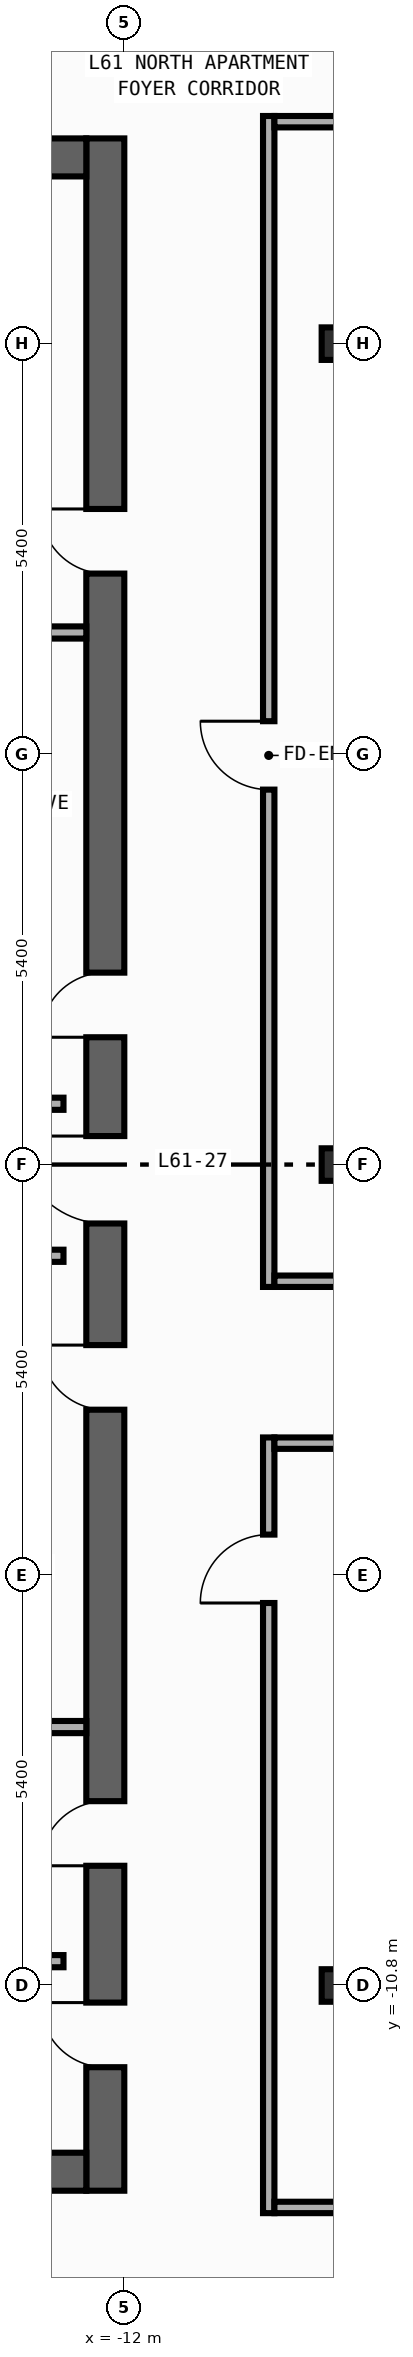
"""IFC4 building model, lengths in metres.
Left out: names, types, materials, properties, quantities, classifications, styles, units other than length and angle.
Written with IfcOpenShell. Run it as: python <this file> out.ifc"""

import sys

from ifc_helpers import new_model, si_unit, direction, frame, frame_2d, origin, origin_2d, place, context, subcontext, project, spatial, rectangle, i_section, extrude, element, fill, save


model = new_model("IFC4")
c1 = context("Model", 3, precision=1e-05, world=origin(), true_north=direction((0.0, 1.0)))
c2 = subcontext(c1, "Body", "Model", "MODEL_VIEW")
j1 = project(units=[si_unit("LENGTHUNIT", "METRE"), si_unit("PLANEANGLEUNIT", "RADIAN")], contexts=[c1])
p1 = place(None, origin())
s1 = spatial("IfcSite", under=j1, at=p1, CompositionType="ELEMENT")
p2 = place(p1, origin())
s2 = spatial("IfcBuilding", under=s1, at=p2, CompositionType="ELEMENT")
p3 = place(p2, frame((0.0, 0.0, 258.4)))
s3 = spatial("IfcBuildingStorey", under=s2, at=p3, CompositionType="ELEMENT", Elevation=258.4)
p4 = place(p3, frame((-12.25, -13.5, 0.0), z_axis=(0.0, 0.0, 1.0), x_axis=(0.0, 1.0, 0.0)))
e1 = element("IfcWall", 1, at=p4, inside=s3, PredefinedType="SHEAR", context=c2, shape_type="SweptSolid", body=[
    extrude(rectangle(XDim=27.0, YDim=0.5, at=frame_2d((13.5, 0.0))), origin(), (0.0, 0.0, 1.0), 3.34),
])
p5 = place(p4, frame((15.175, 0.0, 0.0)))
e2 = element("IfcOpeningElement", 2, at=p5, cuts=e1, PredefinedType="OPENING", context=c2, shape_type="SweptSolid", body=[
    extrude(rectangle(XDim=0.85, YDim=2.1, at=frame_2d((0.425, 1.05))), frame((0.0, 0.26, 0.0), z_axis=(0.0, -1.0, 0.0), x_axis=(1.0, 0.0, 0.0)), (0.0, 0.0, 1.0), 0.52),
])
p6 = place(p4, frame((21.275, 0.0, 0.0)))
e3 = element("IfcOpeningElement", 3, at=p6, cuts=e1, PredefinedType="OPENING", context=c2, shape_type="SweptSolid", body=[
    extrude(rectangle(XDim=0.85, YDim=2.1, at=frame_2d((0.425, 1.05))), frame((0.0, 0.26, 0.0), z_axis=(0.0, -1.0, 0.0), x_axis=(1.0, 0.0, 0.0)), (0.0, 0.0, 1.0), 0.52),
])
p7 = place(p4, frame((4.275, 0.0, 0.0)))
e4 = element("IfcOpeningElement", 4, at=p7, cuts=e1, PredefinedType="OPENING", context=c2, shape_type="SweptSolid", body=[
    extrude(rectangle(XDim=0.85, YDim=2.1, at=frame_2d((0.425, 1.05))), frame((0.0, 0.26, 0.0), z_axis=(0.0, -1.0, 0.0), x_axis=(1.0, 0.0, 0.0)), (0.0, 0.0, 1.0), 0.52),
])
p8 = place(p4, frame((10.275, 0.0, 0.0)))
e5 = element("IfcOpeningElement", 5, at=p8, cuts=e1, PredefinedType="OPENING", context=c2, shape_type="SweptSolid", body=[
    extrude(rectangle(XDim=0.85, YDim=2.1, at=frame_2d((0.425, 1.05))), frame((0.0, 0.26, 0.0), z_axis=(0.0, -1.0, 0.0), x_axis=(1.0, 0.0, 0.0)), (0.0, 0.0, 1.0), 0.52),
])
p9 = place(p4, frame((12.725, 0.0, 0.0)))
e6 = element("IfcOpeningElement", 6, at=p9, cuts=e1, PredefinedType="OPENING", context=c2, shape_type="SweptSolid", body=[
    extrude(rectangle(XDim=1.15, YDim=2.2, at=frame_2d((0.575, 1.1))), frame((0.0, 0.26, 0.0), z_axis=(0.0, -1.0, 0.0), x_axis=(1.0, 0.0, 0.0)), (0.0, 0.0, 1.0), 0.52),
])
p10 = place(p4, frame((1.625, 0.0, 0.0)))
e7 = element("IfcOpeningElement", 7, at=p10, cuts=e1, PredefinedType="OPENING", context=c2, shape_type="SweptSolid", body=[
    extrude(rectangle(XDim=0.85, YDim=2.1, at=frame_2d((0.425, 1.05))), frame((0.0, 0.26, 0.0), z_axis=(0.0, -1.0, 0.0), x_axis=(1.0, 0.0, 0.0)), (0.0, 0.0, 1.0), 0.52),
])
for number, where, z_axis, x_axis in (
    (8, (-19.9, -13.25, 0.0), (0.0, 0.0, 1.0), (1.0, 0.0, 0.0)),
    (9, (-19.9, 13.25, 0.0), (0.0, 0.0, 1.0), (1.0, 0.0, 0.0)),
):
    element("IfcWall", number, at=place(p3, frame(where, z_axis=z_axis, x_axis=x_axis)), inside=s3, PredefinedType="SHEAR", context=c2, shape_type="SweptSolid", body=[
        extrude(rectangle(XDim=7.4, YDim=0.5, at=frame_2d((3.7, 0.0))), origin(), (0.0, 0.0, 1.0), 3.34),
    ])
for number, where, z_axis, x_axis in (
    (10, (-9.2, -10.8, 0.0), (0.0, 0.0, 1.0), (1.0, 0.0, 0.0)),
    (11, (-9.2, 0.0, 0.0), (0.0, 0.0, 1.0), (1.0, 0.0, 0.0)),
    (12, (-9.2, 10.8, 0.0), (0.0, 0.0, 1.0), (1.0, 0.0, 0.0)),
):
    element("IfcColumn", number, at=place(p3, frame(where, z_axis=z_axis, x_axis=x_axis)), inside=s3, PredefinedType="COLUMN", context=c2, shape_type="SweptSolid", body=[
        extrude(i_section(OverallWidth=0.407, OverallDepth=0.428, WebThickness=0.02, FlangeThickness=0.035, FilletRadius=0.022, at=origin_2d()), origin(), (0.0, 0.0, 1.0), 3.6),
    ])
for number, where, z_axis, x_axis in (
    (13, (-15.4, 0.8, 0.0), (0.0, 0.0, 1.0), (1.0, 0.0, 0.0)),
    (14, (-15.4, -1.2, 0.0), (0.0, 0.0, 1.0), (1.0, 0.0, 0.0)),
    (15, (-15.4, -10.48, 0.0), (0.0, 0.0, 1.0), (1.0, 0.0, 0.0)),
):
    element("IfcWall", number, at=place(p3, frame(where, z_axis=z_axis, x_axis=x_axis)), inside=s3, PredefinedType="STANDARD", context=c2, shape_type="SweptSolid", body=[
        extrude(rectangle(XDim=2.6, YDim=0.16, at=frame_2d((1.3, 0.0))), origin(), (0.0, 0.0, 1.0), 3.34),
    ])
for number, where, z_axis, x_axis in (
    (16, (-15.4, 7.0, 0.0), (0.0, 0.0, 1.0), (1.0, 0.0, 0.0)),
    (17, (-15.4, -7.4, 0.0), (0.0, 0.0, 1.0), (1.0, 0.0, 0.0)),
):
    element("IfcWall", number, at=place(p3, frame(where, z_axis=z_axis, x_axis=x_axis)), inside=s3, PredefinedType="PARTITIONING", context=c2, shape_type="SweptSolid", body=[
        extrude(rectangle(XDim=2.9, YDim=0.16, at=frame_2d((1.45, 0.0))), origin(), (0.0, 0.0, 1.0), 3.34),
    ])
p11 = place(p3, frame((-10.1, -1.61, 0.0), z_axis=(0.0, 0.0, 1.0), x_axis=(0.0, 1.0, 0.0)))
e18 = element("IfcWall", 18, at=p11, inside=s3, PredefinedType="PARTITIONING", context=c2, shape_type="SweptSolid", body=[
    extrude(rectangle(XDim=15.405, YDim=0.15, at=frame_2d((7.703, 0.0))), origin(), (0.0, 0.0, 1.0), 3.34),
])
p12 = place(p11, frame((6.543, 0.0, 0.0)))
e19 = element("IfcOpeningElement", 19, at=p12, cuts=e18, PredefinedType="OPENING", context=c2, shape_type="SweptSolid", body=[
    extrude(rectangle(XDim=0.9, YDim=2.15, at=frame_2d((0.45, 1.075))), frame((0.0, 0.085, 0.0), z_axis=(0.0, -1.0, 0.0), x_axis=(1.0, 0.0, 0.0)), (0.0, 0.0, 1.0), 0.17),
])
p13 = place(p3, frame((-10.1, -13.795, 0.0), z_axis=(0.0, 0.0, 1.0), x_axis=(0.0, 1.0, 0.0)))
e20 = element("IfcWall", 20, at=p13, inside=s3, PredefinedType="PARTITIONING", context=c2, shape_type="SweptSolid", body=[
    extrude(rectangle(XDim=10.205, YDim=0.15, at=frame_2d((5.103, 0.0))), origin(), (0.0, 0.0, 1.0), 3.34),
])
p14 = place(p13, frame((8.027, 0.0, 0.0)))
e21 = element("IfcOpeningElement", 21, at=p14, cuts=e20, PredefinedType="OPENING", context=c2, shape_type="SweptSolid", body=[
    extrude(rectangle(XDim=0.9, YDim=2.15, at=frame_2d((0.45, 1.075))), frame((0.0, 0.085, 0.0), z_axis=(0.0, -1.0, 0.0), x_axis=(1.0, 0.0, 0.0)), (0.0, 0.0, 1.0), 0.17),
])
p15 = place(p3, frame((-10.025, -1.535, 0.0), z_axis=(0.0, 0.0, 1.0), x_axis=(1.0, 0.0, 0.0)))
e22 = element("IfcWall", 22, at=p15, inside=s3, PredefinedType="PARTITIONING", context=c2, shape_type="SweptSolid", body=[
    extrude(rectangle(XDim=6.235, YDim=0.15, at=frame_2d((3.117, 0.0))), origin(), (0.0, 0.0, 1.0), 3.34),
])
p16 = place(p15, frame((4.875, 0.0, 0.0)))
e23 = element("IfcOpeningElement", 23, at=p16, cuts=e22, PredefinedType="OPENING", context=c2, shape_type="SweptSolid", body=[
    extrude(rectangle(XDim=0.9, YDim=2.15, at=frame_2d((0.45, 1.075))), frame((0.0, 0.085, 0.0), z_axis=(0.0, -1.0, 0.0), x_axis=(1.0, 0.0, 0.0)), (0.0, 0.0, 1.0), 0.17),
])
p17 = place(p3, frame((-10.025, -3.665, 0.0), z_axis=(0.0, 0.0, 1.0), x_axis=(1.0, 0.0, 0.0)))
e24 = element("IfcWall", 24, at=p17, inside=s3, PredefinedType="PARTITIONING", context=c2, shape_type="SweptSolid", body=[
    extrude(rectangle(XDim=6.255, YDim=0.15, at=frame_2d((3.127, 0.0))), origin(), (0.0, 0.0, 1.0), 3.34),
])
p18 = place(p17, frame((4.895, 0.0, 0.0)))
e25 = element("IfcOpeningElement", 25, at=p18, cuts=e24, PredefinedType="OPENING", context=c2, shape_type="SweptSolid", body=[
    extrude(rectangle(XDim=0.9, YDim=2.15, at=frame_2d((0.45, 1.075))), frame((0.0, 0.085, 0.0), z_axis=(0.0, -1.0, 0.0), x_axis=(1.0, 0.0, 0.0)), (0.0, 0.0, 1.0), 0.17),
])
p19 = place(p3, frame((-10.025, 13.72, 0.0), z_axis=(0.0, 0.0, 1.0), x_axis=(1.0, 0.0, 0.0)))
e26 = element("IfcWall", 26, at=p19, inside=s3, PredefinedType="PARTITIONING", context=c2, shape_type="SweptSolid", body=[
    extrude(rectangle(XDim=6.085, YDim=0.15, at=frame_2d((3.042, 0.0))), origin(), (0.0, 0.0, 1.0), 3.34),
])
p20 = place(p19, frame((4.116, 0.0, 0.0)))
e27 = element("IfcOpeningElement", 27, at=p20, cuts=e26, PredefinedType="OPENING", context=c2, shape_type="SweptSolid", body=[
    extrude(rectangle(XDim=0.9, YDim=2.15, at=frame_2d((0.45, 1.075))), frame((0.0, 0.085, 0.0), z_axis=(0.0, -1.0, 0.0), x_axis=(1.0, 0.0, 0.0)), (0.0, 0.0, 1.0), 0.17),
])
p21 = place(p3, frame((-10.025, -13.72, 0.0), z_axis=(0.0, 0.0, 1.0), x_axis=(1.0, 0.0, 0.0)))
e28 = element("IfcWall", 28, at=p21, inside=s3, PredefinedType="PARTITIONING", context=c2, shape_type="SweptSolid", body=[
    extrude(rectangle(XDim=6.255, YDim=0.15, at=frame_2d((3.127, 0.0))), origin(), (0.0, 0.0, 1.0), 3.34),
])
p22 = place(p21, frame((4.29, 0.0, 0.0)))
e29 = element("IfcOpeningElement", 29, at=p22, cuts=e28, PredefinedType="OPENING", context=c2, shape_type="SweptSolid", body=[
    extrude(rectangle(XDim=0.9, YDim=2.15, at=frame_2d((0.45, 1.075))), frame((0.0, 0.085, 0.0), z_axis=(0.0, -1.0, 0.0), x_axis=(1.0, 0.0, 0.0)), (0.0, 0.0, 1.0), 0.17),
])
p23 = place(p5, origin())
e30 = element("IfcDoor", 30, at=p23, inside=s3, OperationType="SINGLE_SWING_LEFT", PredefinedType="DOOR", context=c2, shape_type="SweptSolid", body=[
    extrude(rectangle(XDim=0.85, YDim=2.1, at=frame_2d((0.425, 1.05))), frame((0.0, 0.025, 0.0), z_axis=(0.0, -1.0, 0.0), x_axis=(1.0, 0.0, 0.0)), (0.0, 0.0, 1.0), 0.05),
])
fill(e2, e30)
p24 = place(p6, origin())
e31 = element("IfcDoor", 31, at=p24, inside=s3, OperationType="SINGLE_SWING_RIGHT", PredefinedType="DOOR", context=c2, shape_type="SweptSolid", body=[
    extrude(rectangle(XDim=0.85, YDim=2.1, at=frame_2d((0.425, 1.05))), frame((0.0, 0.025, 0.0), z_axis=(0.0, -1.0, 0.0), x_axis=(1.0, 0.0, 0.0)), (0.0, 0.0, 1.0), 0.05),
])
fill(e3, e31)
p25 = place(p7, origin())
e32 = element("IfcDoor", 32, at=p25, inside=s3, OperationType="SINGLE_SWING_LEFT", PredefinedType="DOOR", context=c2, shape_type="SweptSolid", body=[
    extrude(rectangle(XDim=0.85, YDim=2.1, at=frame_2d((0.425, 1.05))), frame((0.0, 0.025, 0.0), z_axis=(0.0, -1.0, 0.0), x_axis=(1.0, 0.0, 0.0)), (0.0, 0.0, 1.0), 0.05),
])
fill(e4, e32)
p26 = place(p8, origin())
e33 = element("IfcDoor", 33, at=p26, inside=s3, OperationType="SINGLE_SWING_RIGHT", PredefinedType="DOOR", context=c2, shape_type="SweptSolid", body=[
    extrude(rectangle(XDim=0.85, YDim=2.1, at=frame_2d((0.425, 1.05))), frame((0.0, 0.025, 0.0), z_axis=(0.0, -1.0, 0.0), x_axis=(1.0, 0.0, 0.0)), (0.0, 0.0, 1.0), 0.05),
])
fill(e5, e33)
p27 = place(p9, origin())
e34 = element("IfcDoor", 34, at=p27, inside=s3, OperationType="SINGLE_SWING_RIGHT", PredefinedType="DOOR", context=c2, shape_type="SweptSolid", body=[
    extrude(rectangle(XDim=1.15, YDim=2.2, at=frame_2d((0.575, 1.1))), frame((0.0, 0.025, 0.0), z_axis=(0.0, -1.0, 0.0), x_axis=(1.0, 0.0, 0.0)), (0.0, 0.0, 1.0), 0.05),
])
fill(e6, e34)
p28 = place(p10, origin())
e35 = element("IfcDoor", 35, at=p28, inside=s3, OperationType="SINGLE_SWING_RIGHT", PredefinedType="DOOR", context=c2, shape_type="SweptSolid", body=[
    extrude(rectangle(XDim=0.85, YDim=2.1, at=frame_2d((0.425, 1.05))), frame((0.0, 0.025, 0.0), z_axis=(0.0, -1.0, 0.0), x_axis=(1.0, 0.0, 0.0)), (0.0, 0.0, 1.0), 0.05),
])
fill(e7, e35)
p29 = place(p12, origin())
e36 = element("IfcDoor", 36, at=p29, inside=s3, OperationType="SINGLE_SWING_RIGHT", PredefinedType="DOOR", context=c2, shape_type="SweptSolid", body=[
    extrude(rectangle(XDim=0.9, YDim=2.15, at=frame_2d((0.45, 1.075))), frame((0.0, 0.025, 0.0), z_axis=(0.0, -1.0, 0.0), x_axis=(1.0, 0.0, 0.0)), (0.0, 0.0, 1.0), 0.05),
])
fill(e19, e36)
p30 = place(p14, origin())
e37 = element("IfcDoor", 37, at=p30, inside=s3, OperationType="SINGLE_SWING_LEFT", PredefinedType="DOOR", context=c2, shape_type="SweptSolid", body=[
    extrude(rectangle(XDim=0.9, YDim=2.15, at=frame_2d((0.45, 1.075))), frame((0.0, 0.025, 0.0), z_axis=(0.0, -1.0, 0.0), x_axis=(1.0, 0.0, 0.0)), (0.0, 0.0, 1.0), 0.05),
])
fill(e21, e37)
save(model, sys.argv[1])
